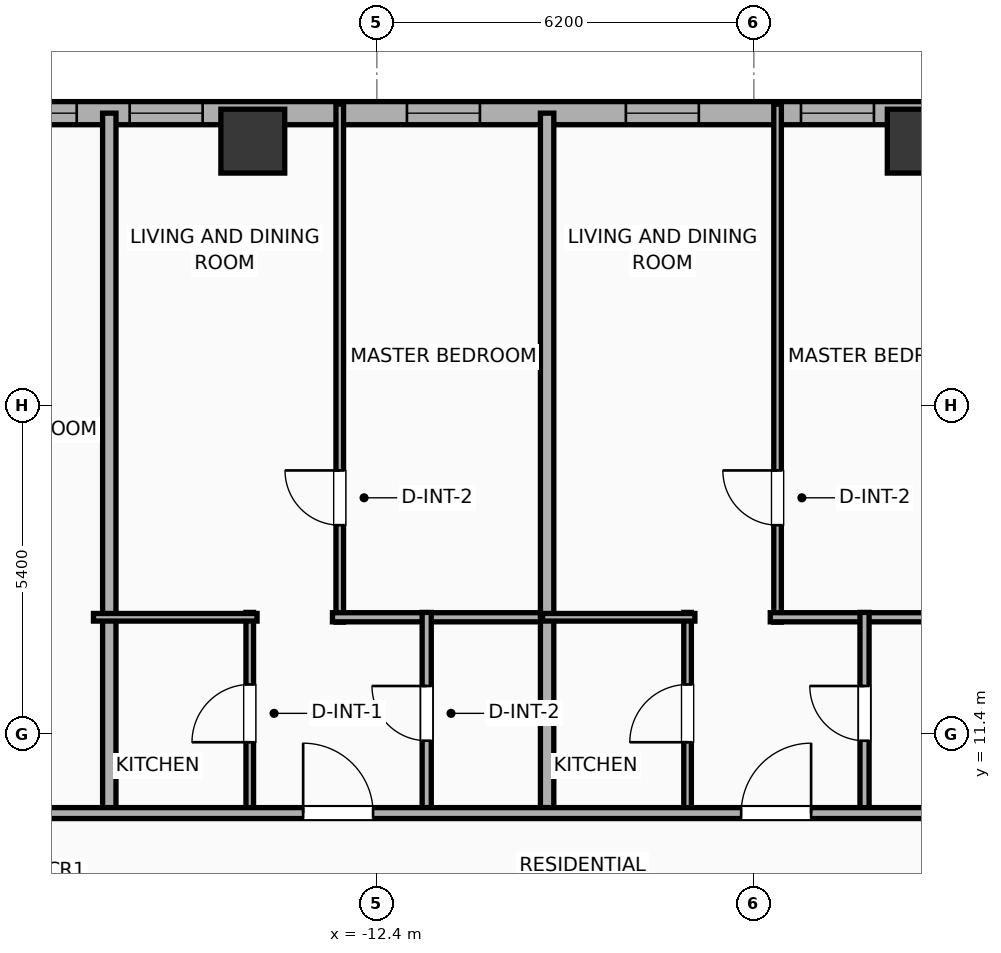
"""IFC4 building model, lengths in metres.
Left out: names, types, materials, properties, quantities, classifications, styles, units other than length and angle.
Written with IfcOpenShell. Run it as: python <this file> out.ifc"""

import sys

from ifc_helpers import new_model, si_unit, direction, frame, frame_2d, origin, origin_2d, place, context, subcontext, project, spatial, rectangle, hollow_rectangle, extrude, element, fill, save


model = new_model("IFC4")
c1 = context("Model", 3, precision=1e-05, world=origin(), true_north=direction((0.0, 1.0)))
c2 = subcontext(c1, "Body", "Model", "MODEL_VIEW")
j1 = project(units=[si_unit("LENGTHUNIT", "METRE"), si_unit("PLANEANGLEUNIT", "RADIAN")], contexts=[c1])
p1 = place(None, origin())
s1 = spatial("IfcSite", under=j1, at=p1, CompositionType="ELEMENT")
p2 = place(p1, origin())
s2 = spatial("IfcBuilding", under=s1, at=p2, CompositionType="ELEMENT")
p3 = place(p2, frame((0.0, 0.0, 136.5)))
s3 = spatial("IfcBuildingStorey", under=s2, at=p3, CompositionType="ELEMENT", Elevation=136.5)
for number, where, z_axis, x_axis in (
    (1, (-3.48, 21.15, 0.0), (0.0, 0.0, 1.0), (1.0, 0.0, 0.0)),
    (2, (-14.44, 21.15, 0.0), (0.0, 0.0, 1.0), (1.0, 0.0, 0.0)),
):
    element("IfcColumn", number, at=place(p3, frame(where, z_axis=z_axis, x_axis=x_axis)), inside=s3, PredefinedType="COLUMN", context=c2, shape_type="SweptSolid", body=[
        extrude(hollow_rectangle(XDim=1.05, YDim=1.05, WallThickness=0.036, at=origin_2d()), origin(), (0.0, 0.0, 1.0), 3.865),
    ])
p4 = place(p3, frame((-25.381, 21.61, 0.0), z_axis=(0.0, 0.0, 1.0), x_axis=(1.0, 0.0, 0.0)))
e3 = element("IfcWall", 3, at=p4, inside=s3, PredefinedType="ELEMENTEDWALL", context=c2, shape_type="SweptSolid", body=[
    extrude(rectangle(XDim=54.763, YDim=0.38, at=frame_2d((27.381, 0.0))), origin(), (0.0, 0.0, 1.0), 2.39),
])
p5 = place(p4, frame((5.645, 0.0, 0.75)))
e4 = element("IfcOpeningElement", 4, at=p5, cuts=e3, PredefinedType="OPENING", context=c2, shape_type="SweptSolid", body=[
    extrude(rectangle(XDim=2.4, YDim=1.45, at=frame_2d((1.2, 0.725))), frame((0.0, 0.2, 0.0), z_axis=(0.0, -1.0, 0.0), x_axis=(1.0, 0.0, 0.0)), (0.0, 0.0, 1.0), 0.4),
])
p6 = place(p4, frame((34.677, 0.0, 0.75)))
e5 = element("IfcOpeningElement", 5, at=p6, cuts=e3, PredefinedType="OPENING", context=c2, shape_type="SweptSolid", body=[
    extrude(rectangle(XDim=2.4, YDim=1.45, at=frame_2d((1.2, 0.725))), frame((0.0, 0.2, 0.0), z_axis=(0.0, -1.0, 0.0), x_axis=(1.0, 0.0, 0.0)), (0.0, 0.0, 1.0), 0.4),
])
p7 = place(p4, frame((45.067, 0.0, 0.75)))
e6 = element("IfcOpeningElement", 6, at=p7, cuts=e3, PredefinedType="OPENING", context=c2, shape_type="SweptSolid", body=[
    extrude(rectangle(XDim=2.4, YDim=1.45, at=frame_2d((1.2, 0.725))), frame((0.0, 0.2, 0.0), z_axis=(0.0, -1.0, 0.0), x_axis=(1.0, 0.0, 0.0)), (0.0, 0.0, 1.0), 0.4),
])
p8 = place(p4, frame((2.938, 0.0, 0.55)))
e7 = element("IfcOpeningElement", 7, at=p8, cuts=e3, PredefinedType="OPENING", context=c2, shape_type="SweptSolid", body=[
    extrude(rectangle(XDim=1.2, YDim=1.15, at=frame_2d((0.6, 0.575))), frame((0.0, 0.2, 0.0), z_axis=(0.0, -1.0, 0.0), x_axis=(1.0, 0.0, 0.0)), (0.0, 0.0, 1.0), 0.4),
])
p9 = place(p4, frame((8.916, 0.0, 0.55)))
e8 = element("IfcOpeningElement", 8, at=p9, cuts=e3, PredefinedType="OPENING", context=c2, shape_type="SweptSolid", body=[
    extrude(rectangle(XDim=1.2, YDim=1.15, at=frame_2d((0.6, 0.575))), frame((0.0, 0.2, 0.0), z_axis=(0.0, -1.0, 0.0), x_axis=(1.0, 0.0, 0.0)), (0.0, 0.0, 1.0), 0.4),
])
p10 = place(p4, frame((13.476, 0.0, 0.55)))
e9 = element("IfcOpeningElement", 9, at=p10, cuts=e3, PredefinedType="OPENING", context=c2, shape_type="SweptSolid", body=[
    extrude(rectangle(XDim=1.2, YDim=1.15, at=frame_2d((0.6, 0.575))), frame((0.0, 0.2, 0.0), z_axis=(0.0, -1.0, 0.0), x_axis=(1.0, 0.0, 0.0)), (0.0, 0.0, 1.0), 0.4),
])
p11 = place(p4, frame((17.076, 0.0, 0.55)))
e10 = element("IfcOpeningElement", 10, at=p11, cuts=e3, PredefinedType="OPENING", context=c2, shape_type="SweptSolid", body=[
    extrude(rectangle(XDim=1.2, YDim=1.15, at=frame_2d((0.6, 0.575))), frame((0.0, 0.2, 0.0), z_axis=(0.0, -1.0, 0.0), x_axis=(1.0, 0.0, 0.0)), (0.0, 0.0, 1.0), 0.4),
])
p12 = place(p4, frame((19.956, 0.0, 0.55)))
e11 = element("IfcOpeningElement", 11, at=p12, cuts=e3, PredefinedType="OPENING", context=c2, shape_type="SweptSolid", body=[
    extrude(rectangle(XDim=1.2, YDim=1.15, at=frame_2d((0.6, 0.575))), frame((0.0, 0.2, 0.0), z_axis=(0.0, -1.0, 0.0), x_axis=(1.0, 0.0, 0.0)), (0.0, 0.0, 1.0), 0.4),
])
p13 = place(p4, frame((24.276, 0.0, 0.55)))
e12 = element("IfcOpeningElement", 12, at=p13, cuts=e3, PredefinedType="OPENING", context=c2, shape_type="SweptSolid", body=[
    extrude(rectangle(XDim=1.2, YDim=1.15, at=frame_2d((0.6, 0.575))), frame((0.0, 0.2, 0.0), z_axis=(0.0, -1.0, 0.0), x_axis=(1.0, 0.0, 0.0)), (0.0, 0.0, 1.0), 0.4),
])
p14 = place(p4, frame((27.876, 0.0, 0.55)))
e13 = element("IfcOpeningElement", 13, at=p14, cuts=e3, PredefinedType="OPENING", context=c2, shape_type="SweptSolid", body=[
    extrude(rectangle(XDim=1.2, YDim=1.15, at=frame_2d((0.6, 0.575))), frame((0.0, 0.2, 0.0), z_axis=(0.0, -1.0, 0.0), x_axis=(1.0, 0.0, 0.0)), (0.0, 0.0, 1.0), 0.4),
])
p15 = place(p4, frame((30.876, 0.0, 0.55)))
e14 = element("IfcOpeningElement", 14, at=p15, cuts=e3, PredefinedType="OPENING", context=c2, shape_type="SweptSolid", body=[
    extrude(rectangle(XDim=1.2, YDim=1.15, at=frame_2d((0.6, 0.575))), frame((0.0, 0.2, 0.0), z_axis=(0.0, -1.0, 0.0), x_axis=(1.0, 0.0, 0.0)), (0.0, 0.0, 1.0), 0.4),
])
p16 = place(p4, frame((38.676, 0.0, 0.55)))
e15 = element("IfcOpeningElement", 15, at=p16, cuts=e3, PredefinedType="OPENING", context=c2, shape_type="SweptSolid", body=[
    extrude(rectangle(XDim=1.2, YDim=1.15, at=frame_2d((0.6, 0.575))), frame((0.0, 0.2, 0.0), z_axis=(0.0, -1.0, 0.0), x_axis=(1.0, 0.0, 0.0)), (0.0, 0.0, 1.0), 0.4),
])
p17 = place(p4, frame((41.796, 0.0, 0.55)))
e16 = element("IfcOpeningElement", 16, at=p17, cuts=e3, PredefinedType="OPENING", context=c2, shape_type="SweptSolid", body=[
    extrude(rectangle(XDim=1.2, YDim=1.15, at=frame_2d((0.6, 0.575))), frame((0.0, 0.2, 0.0), z_axis=(0.0, -1.0, 0.0), x_axis=(1.0, 0.0, 0.0)), (0.0, 0.0, 1.0), 0.4),
])
p18 = place(p4, frame((49.476, 0.0, 0.55)))
e17 = element("IfcOpeningElement", 17, at=p18, cuts=e3, PredefinedType="OPENING", context=c2, shape_type="SweptSolid", body=[
    extrude(rectangle(XDim=1.2, YDim=1.15, at=frame_2d((0.6, 0.575))), frame((0.0, 0.2, 0.0), z_axis=(0.0, -1.0, 0.0), x_axis=(1.0, 0.0, 0.0)), (0.0, 0.0, 1.0), 0.4),
])
p19 = place(p4, frame((52.227, 0.0, 0.55)))
e18 = element("IfcOpeningElement", 18, at=p19, cuts=e3, PredefinedType="OPENING", context=c2, shape_type="SweptSolid", body=[
    extrude(rectangle(XDim=1.2, YDim=1.15, at=frame_2d((0.6, 0.575))), frame((0.0, 0.2, 0.0), z_axis=(0.0, -1.0, 0.0), x_axis=(1.0, 0.0, 0.0)), (0.0, 0.0, 1.0), 0.4),
])
p20 = place(p3, frame((-16.8, 10.02, 0.0), z_axis=(0.0, 0.0, 1.0), x_axis=(0.0, 1.0, 0.0)))
e19 = element("IfcWall", 19, at=p20, inside=s3, PredefinedType="PARTITIONING", context=c2, shape_type="SweptSolid", body=[
    extrude(rectangle(XDim=11.59, YDim=0.22, at=frame_2d((5.795, 0.0))), origin(), (0.0, 0.0, 1.0), 3.5),
])
p21 = place(p3, frame((-13.01, 13.24, 0.0), z_axis=(0.0, 0.0, 1.0), x_axis=(0.0, 1.0, 0.0)))
e20 = element("IfcWall", 20, at=p21, inside=s3, PredefinedType="PARTITIONING", context=c2, shape_type="SweptSolid", body=[
    extrude(rectangle(XDim=8.52, YDim=0.125, at=frame_2d((4.26, 0.0))), origin(), (0.0, 0.0, 1.0), 3.5),
])
p22 = place(p21, frame((1.595, 0.0, 0.0)))
e21 = element("IfcOpeningElement", 21, at=p22, cuts=e20, PredefinedType="OPENING", context=c2, shape_type="SweptSolid", body=[
    extrude(rectangle(XDim=0.9, YDim=2.05, at=frame_2d((0.45, 1.025))), frame((0.0, 0.073, 0.0), z_axis=(0.0, -1.0, 0.0), x_axis=(1.0, 0.0, 0.0)), (0.0, 0.0, 1.0), 0.145),
])
p23 = place(p3, frame((-13.13, 13.32, 0.0), z_axis=(0.0, 0.0, 1.0), x_axis=(1.0, 0.0, 0.0)))
e22 = element("IfcWall", 22, at=p23, inside=s3, PredefinedType="PLUMBINGWALL", context=c2, shape_type="SweptSolid", body=[
    extrude(rectangle(XDim=3.605, YDim=0.15, at=frame_2d((1.802, 0.0))), origin(), (0.0, 0.0, 1.0), 3.5),
])
p24 = place(p3, frame((-14.49, 10.08, 0.0), z_axis=(0.0, 0.0, 1.0), x_axis=(0.0, 1.0, 0.0)))
e23 = element("IfcWall", 23, at=p24, inside=s3, PredefinedType="PARTITIONING", context=c2, shape_type="SweptSolid", body=[
    extrude(rectangle(XDim=3.32, YDim=0.125, at=frame_2d((1.66, 0.0))), origin(), (0.0, 0.0, 1.0), 3.5),
])
p25 = place(p24, frame((1.185, 0.0, 0.0)))
e24 = element("IfcOpeningElement", 24, at=p25, cuts=e23, PredefinedType="OPENING", context=c2, shape_type="SweptSolid", body=[
    extrude(rectangle(XDim=0.95, YDim=2.05, at=frame_2d((0.475, 1.025))), frame((0.0, 0.073, 0.0), z_axis=(0.0, -1.0, 0.0), x_axis=(1.0, 0.0, 0.0)), (0.0, 0.0, 1.0), 0.145),
])
p26 = place(p3, frame((-17.06, 13.32, 0.0), z_axis=(0.0, 0.0, 1.0), x_axis=(1.0, 0.0, 0.0)))
e25 = element("IfcWall", 25, at=p26, inside=s3, PredefinedType="PARTITIONING", context=c2, shape_type="SweptSolid", body=[
    extrude(rectangle(XDim=2.69, YDim=0.125, at=frame_2d((1.345, 0.0))), origin(), (0.0, 0.0, 1.0), 3.5),
])
p27 = place(p3, frame((-11.58, 10.08, 0.0), z_axis=(0.0, 0.0, 1.0), x_axis=(0.0, 1.0, 0.0)))
e26 = element("IfcWall", 26, at=p27, inside=s3, PredefinedType="PLUMBINGWALL", context=c2, shape_type="SweptSolid", body=[
    extrude(rectangle(XDim=3.32, YDim=0.15, at=frame_2d((1.66, 0.0))), origin(), (0.0, 0.0, 1.0), 2.39),
])
p28 = place(p27, frame((1.21, 0.0, 0.0)))
e27 = element("IfcOpeningElement", 27, at=p28, cuts=e26, PredefinedType="OPENING", context=c2, shape_type="SweptSolid", body=[
    extrude(rectangle(XDim=0.9, YDim=2.05, at=frame_2d((0.45, 1.025))), frame((0.0, 0.085, 0.0), z_axis=(0.0, -1.0, 0.0), x_axis=(1.0, 0.0, 0.0)), (0.0, 0.0, 1.0), 0.17),
])
p29 = place(p3, frame((-9.6, 10.02, 0.0), z_axis=(0.0, 0.0, 1.0), x_axis=(0.0, 1.0, 0.0)))
e28 = element("IfcWall", 28, at=p29, inside=s3, PredefinedType="PARTITIONING", context=c2, shape_type="SweptSolid", body=[
    extrude(rectangle(XDim=11.59, YDim=0.22, at=frame_2d((5.795, 0.0))), origin(), (0.0, 0.0, 1.0), 2.39),
])
p30 = place(p3, frame((-5.81, 13.24, 0.0), z_axis=(0.0, 0.0, 1.0), x_axis=(0.0, 1.0, 0.0)))
e29 = element("IfcWall", 29, at=p30, inside=s3, PredefinedType="PARTITIONING", context=c2, shape_type="SweptSolid", body=[
    extrude(rectangle(XDim=8.52, YDim=0.125, at=frame_2d((4.26, 0.0))), origin(), (0.0, 0.0, 1.0), 3.5),
])
p31 = place(p30, frame((1.595, 0.0, 0.0)))
e30 = element("IfcOpeningElement", 30, at=p31, cuts=e29, PredefinedType="OPENING", context=c2, shape_type="SweptSolid", body=[
    extrude(rectangle(XDim=0.9, YDim=2.05, at=frame_2d((0.45, 1.025))), frame((0.0, 0.073, 0.0), z_axis=(0.0, -1.0, 0.0), x_axis=(1.0, 0.0, 0.0)), (0.0, 0.0, 1.0), 0.145),
])
p32 = place(p3, frame((-5.93, 13.32, 0.0), z_axis=(0.0, 0.0, 1.0), x_axis=(1.0, 0.0, 0.0)))
e31 = element("IfcWall", 31, at=p32, inside=s3, PredefinedType="PLUMBINGWALL", context=c2, shape_type="SweptSolid", body=[
    extrude(rectangle(XDim=3.605, YDim=0.15, at=frame_2d((1.802, 0.0))), origin(), (0.0, 0.0, 1.0), 3.5),
])
p33 = place(p3, frame((-7.29, 10.08, 0.0), z_axis=(0.0, 0.0, 1.0), x_axis=(0.0, 1.0, 0.0)))
e32 = element("IfcWall", 32, at=p33, inside=s3, PredefinedType="PARTITIONING", context=c2, shape_type="SweptSolid", body=[
    extrude(rectangle(XDim=3.32, YDim=0.125, at=frame_2d((1.66, 0.0))), origin(), (0.0, 0.0, 1.0), 3.5),
])
p34 = place(p33, frame((1.185, 0.0, 0.0)))
e33 = element("IfcOpeningElement", 33, at=p34, cuts=e32, PredefinedType="OPENING", context=c2, shape_type="SweptSolid", body=[
    extrude(rectangle(XDim=0.95, YDim=2.05, at=frame_2d((0.475, 1.025))), frame((0.0, 0.073, 0.0), z_axis=(0.0, -1.0, 0.0), x_axis=(1.0, 0.0, 0.0)), (0.0, 0.0, 1.0), 0.145),
])
p35 = place(p3, frame((-9.675, 13.32, 0.0), z_axis=(0.0, 0.0, 1.0), x_axis=(1.0, 0.0, 0.0)))
e34 = element("IfcWall", 34, at=p35, inside=s3, PredefinedType="PARTITIONING", context=c2, shape_type="SweptSolid", body=[
    extrude(rectangle(XDim=2.505, YDim=0.125, at=frame_2d((1.252, 0.0))), origin(), (0.0, 0.0, 1.0), 3.5),
])
p36 = place(p3, frame((-4.38, 10.08, 0.0), z_axis=(0.0, 0.0, 1.0), x_axis=(0.0, 1.0, 0.0)))
e35 = element("IfcWall", 35, at=p36, inside=s3, PredefinedType="PLUMBINGWALL", context=c2, shape_type="SweptSolid", body=[
    extrude(rectangle(XDim=3.32, YDim=0.15, at=frame_2d((1.66, 0.0))), origin(), (0.0, 0.0, 1.0), 3.5),
])
p37 = place(p36, frame((1.21, 0.0, 0.0)))
e36 = element("IfcOpeningElement", 36, at=p37, cuts=e35, PredefinedType="OPENING", context=c2, shape_type="SweptSolid", body=[
    extrude(rectangle(XDim=0.9, YDim=2.05, at=frame_2d((0.45, 1.025))), frame((0.0, 0.085, 0.0), z_axis=(0.0, -1.0, 0.0), x_axis=(1.0, 0.0, 0.0)), (0.0, 0.0, 1.0), 0.17),
])
p38 = place(p3, frame((-29.21, 10.1, 0.0), z_axis=(0.0, 0.0, 1.0), x_axis=(1.0, 0.0, 0.0)))
e37 = element("IfcWall", 37, at=p38, inside=s3, PredefinedType="PARTITIONING", context=c2, shape_type="SweptSolid", body=[
    extrude(rectangle(XDim=62.42, YDim=0.18, at=frame_2d((31.21, 0.0))), origin(), (0.0, 0.0, 1.0), 2.39),
])
p39 = place(p38, frame((2.74, 0.0, 0.0)))
e38 = element("IfcOpeningElement", 38, at=p39, cuts=e37, PredefinedType="OPENING", context=c2, shape_type="SweptSolid", body=[
    extrude(rectangle(XDim=0.9, YDim=2.05, at=frame_2d((0.45, 1.025))), frame((0.0, 0.1, 0.0), z_axis=(0.0, -1.0, 0.0), x_axis=(1.0, 0.0, 0.0)), (0.0, 0.0, 1.0), 0.2),
])
p40 = place(p38, frame((9.868, 0.0, 0.0)))
e39 = element("IfcOpeningElement", 39, at=p40, cuts=e37, PredefinedType="OPENING", context=c2, shape_type="SweptSolid", body=[
    extrude(rectangle(XDim=1.15, YDim=2.05, at=frame_2d((0.575, 1.025))), frame((0.0, 0.1, 0.0), z_axis=(0.0, -1.0, 0.0), x_axis=(1.0, 0.0, 0.0)), (0.0, 0.0, 1.0), 0.2),
])
p41 = place(p38, frame((15.598, 0.0, 0.0)))
e40 = element("IfcOpeningElement", 40, at=p41, cuts=e37, PredefinedType="OPENING", context=c2, shape_type="SweptSolid", body=[
    extrude(rectangle(XDim=1.15, YDim=2.05, at=frame_2d((0.575, 1.025))), frame((0.0, 0.1, 0.0), z_axis=(0.0, -1.0, 0.0), x_axis=(1.0, 0.0, 0.0)), (0.0, 0.0, 1.0), 0.2),
])
p42 = place(p38, frame((22.801, 0.0, 0.0)))
e41 = element("IfcOpeningElement", 41, at=p42, cuts=e37, PredefinedType="OPENING", context=c2, shape_type="SweptSolid", body=[
    extrude(rectangle(XDim=1.15, YDim=2.05, at=frame_2d((0.575, 1.025))), frame((0.0, 0.1, 0.0), z_axis=(0.0, -1.0, 0.0), x_axis=(1.0, 0.0, 0.0)), (0.0, 0.0, 1.0), 0.2),
])
p43 = place(p38, frame((29.998, 0.0, 0.0)))
e42 = element("IfcOpeningElement", 42, at=p43, cuts=e37, PredefinedType="OPENING", context=c2, shape_type="SweptSolid", body=[
    extrude(rectangle(XDim=1.15, YDim=2.05, at=frame_2d((0.575, 1.025))), frame((0.0, 0.1, 0.0), z_axis=(0.0, -1.0, 0.0), x_axis=(1.0, 0.0, 0.0)), (0.0, 0.0, 1.0), 0.2),
])
p44 = place(p38, frame((37.202, 0.0, 0.0)))
e43 = element("IfcOpeningElement", 43, at=p44, cuts=e37, PredefinedType="OPENING", context=c2, shape_type="SweptSolid", body=[
    extrude(rectangle(XDim=1.15, YDim=2.05, at=frame_2d((0.575, 1.025))), frame((0.0, 0.1, 0.0), z_axis=(0.0, -1.0, 0.0), x_axis=(1.0, 0.0, 0.0)), (0.0, 0.0, 1.0), 0.2),
])
p45 = place(p38, frame((44.399, 0.0, 0.0)))
e44 = element("IfcOpeningElement", 44, at=p45, cuts=e37, PredefinedType="OPENING", context=c2, shape_type="SweptSolid", body=[
    extrude(rectangle(XDim=1.15, YDim=2.05, at=frame_2d((0.575, 1.025))), frame((0.0, 0.1, 0.0), z_axis=(0.0, -1.0, 0.0), x_axis=(1.0, 0.0, 0.0)), (0.0, 0.0, 1.0), 0.2),
])
p46 = place(p38, frame((51.602, 0.0, 0.0)))
e45 = element("IfcOpeningElement", 45, at=p46, cuts=e37, PredefinedType="OPENING", context=c2, shape_type="SweptSolid", body=[
    extrude(rectangle(XDim=1.15, YDim=2.05, at=frame_2d((0.575, 1.025))), frame((0.0, 0.1, 0.0), z_axis=(0.0, -1.0, 0.0), x_axis=(1.0, 0.0, 0.0)), (0.0, 0.0, 1.0), 0.2),
])
p47 = place(p38, frame((58.762, 0.0, 0.0)))
e46 = element("IfcOpeningElement", 46, at=p47, cuts=e37, PredefinedType="OPENING", context=c2, shape_type="SweptSolid", body=[
    extrude(rectangle(XDim=0.9, YDim=2.05, at=frame_2d((0.45, 1.025))), frame((0.0, 0.1, 0.0), z_axis=(0.0, -1.0, 0.0), x_axis=(1.0, 0.0, 0.0)), (0.0, 0.0, 1.0), 0.2),
])
p48 = place(p5, origin())
e47 = element("IfcWindow", 47, at=p48, inside=s3, PartitioningType="SINGLE_PANEL", PredefinedType="WINDOW", context=c2, shape_type="SweptSolid", body=[
    extrude(rectangle(XDim=2.4, YDim=1.45, at=frame_2d((1.2, 0.725))), frame((0.0, 0.03, 0.0), z_axis=(0.0, -1.0, 0.0), x_axis=(1.0, 0.0, 0.0)), (0.0, 0.0, 1.0), 0.06),
])
fill(e4, e47)
p49 = place(p9, origin())
e48 = element("IfcWindow", 48, at=p49, inside=s3, PartitioningType="SINGLE_PANEL", PredefinedType="WINDOW", context=c2, shape_type="SweptSolid", body=[
    extrude(rectangle(XDim=1.2, YDim=1.15, at=frame_2d((0.6, 0.575))), frame((0.0, 0.03, 0.0), z_axis=(0.0, -1.0, 0.0), x_axis=(1.0, 0.0, 0.0)), (0.0, 0.0, 1.0), 0.06),
])
fill(e8, e48)
p50 = place(p10, origin())
e49 = element("IfcWindow", 49, at=p50, inside=s3, PartitioningType="SINGLE_PANEL", PredefinedType="WINDOW", context=c2, shape_type="SweptSolid", body=[
    extrude(rectangle(XDim=1.2, YDim=1.15, at=frame_2d((0.6, 0.575))), frame((0.0, 0.03, 0.0), z_axis=(0.0, -1.0, 0.0), x_axis=(1.0, 0.0, 0.0)), (0.0, 0.0, 1.0), 0.06),
])
fill(e9, e49)
p51 = place(p11, origin())
e50 = element("IfcWindow", 50, at=p51, inside=s3, PartitioningType="SINGLE_PANEL", PredefinedType="WINDOW", context=c2, shape_type="SweptSolid", body=[
    extrude(rectangle(XDim=1.2, YDim=1.15, at=frame_2d((0.6, 0.575))), frame((0.0, 0.03, 0.0), z_axis=(0.0, -1.0, 0.0), x_axis=(1.0, 0.0, 0.0)), (0.0, 0.0, 1.0), 0.06),
])
fill(e10, e50)
p52 = place(p12, origin())
e51 = element("IfcWindow", 51, at=p52, inside=s3, PartitioningType="SINGLE_PANEL", PredefinedType="WINDOW", context=c2, shape_type="SweptSolid", body=[
    extrude(rectangle(XDim=1.2, YDim=1.15, at=frame_2d((0.6, 0.575))), frame((0.0, 0.03, 0.0), z_axis=(0.0, -1.0, 0.0), x_axis=(1.0, 0.0, 0.0)), (0.0, 0.0, 1.0), 0.06),
])
fill(e11, e51)
p53 = place(p22, origin())
e52 = element("IfcDoor", 52, at=p53, inside=s3, OperationType="SINGLE_SWING_RIGHT", PredefinedType="DOOR", context=c2, shape_type="SweptSolid", body=[
    extrude(rectangle(XDim=0.9, YDim=2.05, at=frame_2d((0.45, 1.025))), frame((0.0, 0.025, 0.0), z_axis=(0.0, -1.0, 0.0), x_axis=(1.0, 0.0, 0.0)), (0.0, 0.0, 1.0), 0.05),
])
fill(e21, e52)
p54 = place(p25, origin())
e53 = element("IfcDoor", 53, at=p54, inside=s3, OperationType="SINGLE_SWING_LEFT", PredefinedType="DOOR", context=c2, shape_type="SweptSolid", body=[
    extrude(rectangle(XDim=0.95, YDim=2.05, at=frame_2d((0.475, 1.025))), frame((0.0, 0.025, 0.0), z_axis=(0.0, -1.0, 0.0), x_axis=(1.0, 0.0, 0.0)), (0.0, 0.0, 1.0), 0.05),
])
fill(e24, e53)
p55 = place(p28, origin())
e54 = element("IfcDoor", 54, at=p55, inside=s3, OperationType="SINGLE_SWING_RIGHT", PredefinedType="DOOR", context=c2, shape_type="SweptSolid", body=[
    extrude(rectangle(XDim=0.9, YDim=2.05, at=frame_2d((0.45, 1.025))), frame((0.0, 0.025, 0.0), z_axis=(0.0, -1.0, 0.0), x_axis=(1.0, 0.0, 0.0)), (0.0, 0.0, 1.0), 0.05),
])
fill(e27, e54)
p56 = place(p31, origin())
e55 = element("IfcDoor", 55, at=p56, inside=s3, OperationType="SINGLE_SWING_RIGHT", PredefinedType="DOOR", context=c2, shape_type="SweptSolid", body=[
    extrude(rectangle(XDim=0.9, YDim=2.05, at=frame_2d((0.45, 1.025))), frame((0.0, 0.025, 0.0), z_axis=(0.0, -1.0, 0.0), x_axis=(1.0, 0.0, 0.0)), (0.0, 0.0, 1.0), 0.05),
])
fill(e30, e55)
p57 = place(p34, origin())
e56 = element("IfcDoor", 56, at=p57, inside=s3, OperationType="SINGLE_SWING_LEFT", PredefinedType="DOOR", context=c2, shape_type="SweptSolid", body=[
    extrude(rectangle(XDim=0.95, YDim=2.05, at=frame_2d((0.475, 1.025))), frame((0.0, 0.025, 0.0), z_axis=(0.0, -1.0, 0.0), x_axis=(1.0, 0.0, 0.0)), (0.0, 0.0, 1.0), 0.05),
])
fill(e33, e56)
p58 = place(p37, origin())
e57 = element("IfcDoor", 57, at=p58, inside=s3, OperationType="SINGLE_SWING_RIGHT", PredefinedType="DOOR", context=c2, shape_type="SweptSolid", body=[
    extrude(rectangle(XDim=0.9, YDim=2.05, at=frame_2d((0.45, 1.025))), frame((0.0, 0.025, 0.0), z_axis=(0.0, -1.0, 0.0), x_axis=(1.0, 0.0, 0.0)), (0.0, 0.0, 1.0), 0.05),
])
fill(e36, e57)
p59 = place(p41, origin())
e58 = element("IfcDoor", 58, at=p59, inside=s3, OperationType="SINGLE_SWING_LEFT", PredefinedType="DOOR", context=c2, shape_type="SweptSolid", body=[
    extrude(rectangle(XDim=1.15, YDim=2.05, at=frame_2d((0.575, 1.025))), frame((0.0, 0.025, 0.0), z_axis=(0.0, -1.0, 0.0), x_axis=(1.0, 0.0, 0.0)), (0.0, 0.0, 1.0), 0.05),
])
fill(e40, e58)
p60 = place(p42, origin())
e59 = element("IfcDoor", 59, at=p60, inside=s3, OperationType="SINGLE_SWING_RIGHT", PredefinedType="DOOR", context=c2, shape_type="SweptSolid", body=[
    extrude(rectangle(XDim=1.15, YDim=2.05, at=frame_2d((0.575, 1.025))), frame((0.0, 0.025, 0.0), z_axis=(0.0, -1.0, 0.0), x_axis=(1.0, 0.0, 0.0)), (0.0, 0.0, 1.0), 0.05),
])
fill(e41, e59)
save(model, sys.argv[1])
